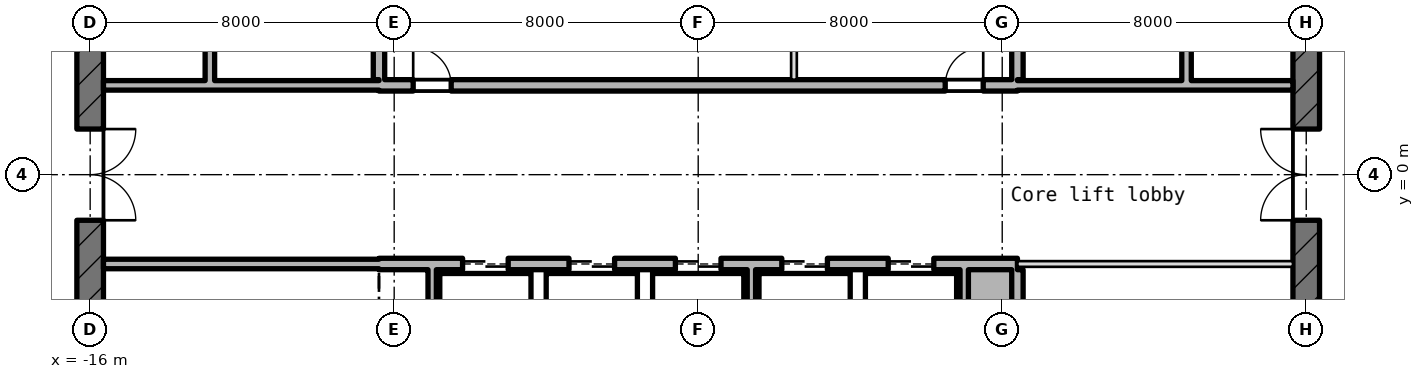
"""IFC4 building model, lengths in metres.
Left out: names, types, materials, properties, quantities, classifications, styles, units other than length and angle.
Written with IfcOpenShell. Run it as: python <this file> out.ifc"""

import sys

from ifc_helpers import new_model, si_unit, direction, frame, frame_2d, origin, place, context, subcontext, project, spatial, rectangle, extrude, element, fill, save


model = new_model("IFC4")
c1 = context("Model", 3, precision=1e-05, world=origin(), true_north=direction((0.0, 1.0)))
c2 = subcontext(c1, "Body", "Model", "MODEL_VIEW")
j1 = project(units=[si_unit("LENGTHUNIT", "METRE"), si_unit("PLANEANGLEUNIT", "RADIAN")], contexts=[c1])
p1 = place(None, origin())
s1 = spatial("IfcSite", under=j1, at=p1, CompositionType="ELEMENT")
p2 = place(p1, origin())
s2 = spatial("IfcBuilding", under=s1, at=p2, CompositionType="ELEMENT")
p3 = place(p2, frame((0.0, 0.0, 371.65)))
s3 = spatial("IfcBuildingStorey", under=s2, at=p3, CompositionType="ELEMENT", Elevation=371.65)
p4 = place(p3, frame((16.0, -10.145, -0.18), z_axis=(0.0, 0.0, 1.0), x_axis=(0.0, 1.0, 0.0)))
e1 = element("IfcWall", 1, at=p4, inside=s3, PredefinedType="SHEAR", context=c2, shape_type="SweptSolid", body=[
    extrude(rectangle(XDim=20.29, YDim=0.7, at=frame_2d((10.145, 0.0))), origin(), (0.0, 0.0, 1.0), 4.15),
])
p5 = place(p4, frame((8.945, 0.0, 0.18)))
e2 = element("IfcOpeningElement", 2, at=p5, cuts=e1, PredefinedType="OPENING", context=c2, shape_type="SweptSolid", body=[
    extrude(rectangle(XDim=2.4, YDim=2.1, at=frame_2d((1.2, 1.05))), frame((0.0, 0.36, 0.0), z_axis=(0.0, -1.0, 0.0), x_axis=(1.0, 0.0, 0.0)), (0.0, 0.0, 1.0), 0.72),
])
p6 = place(p4, frame((13.545, 0.0, 0.18)))
e3 = element("IfcOpeningElement", 3, at=p6, cuts=e1, PredefinedType="OPENING", context=c2, shape_type="SweptSolid", body=[
    extrude(rectangle(XDim=1.2, YDim=2.1, at=frame_2d((0.6, 1.05))), frame((0.0, 0.36, 0.0), z_axis=(0.0, -1.0, 0.0), x_axis=(1.0, 0.0, 0.0)), (0.0, 0.0, 1.0), 0.72),
])
p7 = place(p4, frame((3.545, 0.0, 0.18)))
e4 = element("IfcOpeningElement", 4, at=p7, cuts=e1, PredefinedType="OPENING", context=c2, shape_type="SweptSolid", body=[
    extrude(rectangle(XDim=1.2, YDim=2.1, at=frame_2d((0.6, 1.05))), frame((0.0, 0.36, 0.0), z_axis=(0.0, -1.0, 0.0), x_axis=(1.0, 0.0, 0.0)), (0.0, 0.0, 1.0), 0.72),
])
p8 = place(p3, frame((-16.0, 10.145, -0.18), z_axis=(0.0, 0.0, 1.0), x_axis=(0.0, -1.0, 0.0)))
e5 = element("IfcWall", 5, at=p8, inside=s3, PredefinedType="SHEAR", context=c2, shape_type="SweptSolid", body=[
    extrude(rectangle(XDim=20.29, YDim=0.7, at=frame_2d((10.145, 0.0))), origin(), (0.0, 0.0, 1.0), 4.15),
])
p9 = place(p8, frame((8.945, 0.0, 0.18)))
e6 = element("IfcOpeningElement", 6, at=p9, cuts=e5, PredefinedType="OPENING", context=c2, shape_type="SweptSolid", body=[
    extrude(rectangle(XDim=2.4, YDim=2.1, at=frame_2d((1.2, 1.05))), frame((0.0, 0.36, 0.0), z_axis=(0.0, -1.0, 0.0), x_axis=(1.0, 0.0, 0.0)), (0.0, 0.0, 1.0), 0.72),
])
p10 = place(p8, frame((5.545, 0.0, 0.18)))
e7 = element("IfcOpeningElement", 7, at=p10, cuts=e5, PredefinedType="OPENING", context=c2, shape_type="SweptSolid", body=[
    extrude(rectangle(XDim=1.2, YDim=2.1, at=frame_2d((0.6, 1.05))), frame((0.0, 0.36, 0.0), z_axis=(0.0, -1.0, 0.0), x_axis=(1.0, 0.0, 0.0)), (0.0, 0.0, 1.0), 0.72),
])
p11 = place(p3, frame((-15.65, -2.35, 0.0), z_axis=(0.0, 0.0, 1.0), x_axis=(1.0, 0.0, 0.0)))
e8 = element("IfcWall", 8, at=p11, inside=s3, PredefinedType="STANDARD", context=c2, shape_type="SweptSolid", body=[
    extrude(rectangle(XDim=7.25, YDim=0.25, at=frame_2d((3.625, 0.0))), origin(), (0.0, 0.0, 1.0), 3.97),
])
p12 = place(p3, frame((-8.4, -2.35, -0.18), z_axis=(0.0, 0.0, 1.0), x_axis=(1.0, 0.0, 0.0)))
e9 = element("IfcWall", 9, at=p12, inside=s3, PredefinedType="SHEAR", context=c2, shape_type="SweptSolid", body=[
    extrude(rectangle(XDim=16.8, YDim=0.3, at=frame_2d((8.4, 0.0))), origin(), (0.0, 0.0, 1.0), 4.15),
])
p13 = place(p12, frame((2.2, 0.0, 0.18)))
e10 = element("IfcOpeningElement", 10, at=p13, cuts=e9, PredefinedType="OPENING", context=c2, shape_type="SweptSolid", body=[
    extrude(rectangle(XDim=1.2, YDim=2.1, at=frame_2d((0.6, 1.05))), frame((0.0, 0.16, 0.0), z_axis=(0.0, -1.0, 0.0), x_axis=(1.0, 0.0, 0.0)), (0.0, 0.0, 1.0), 0.32),
])
p14 = place(p12, frame((5.0, 0.0, 0.18)))
e11 = element("IfcOpeningElement", 11, at=p14, cuts=e9, PredefinedType="OPENING", context=c2, shape_type="SweptSolid", body=[
    extrude(rectangle(XDim=1.2, YDim=2.1, at=frame_2d((0.6, 1.05))), frame((0.0, 0.16, 0.0), z_axis=(0.0, -1.0, 0.0), x_axis=(1.0, 0.0, 0.0)), (0.0, 0.0, 1.0), 0.32),
])
p15 = place(p12, frame((7.8, 0.0, 0.18)))
e12 = element("IfcOpeningElement", 12, at=p15, cuts=e9, PredefinedType="OPENING", context=c2, shape_type="SweptSolid", body=[
    extrude(rectangle(XDim=1.2, YDim=2.1, at=frame_2d((0.6, 1.05))), frame((0.0, 0.16, 0.0), z_axis=(0.0, -1.0, 0.0), x_axis=(1.0, 0.0, 0.0)), (0.0, 0.0, 1.0), 0.32),
])
p16 = place(p12, frame((10.6, 0.0, 0.18)))
e13 = element("IfcOpeningElement", 13, at=p16, cuts=e9, PredefinedType="OPENING", context=c2, shape_type="SweptSolid", body=[
    extrude(rectangle(XDim=1.2, YDim=2.1, at=frame_2d((0.6, 1.05))), frame((0.0, 0.16, 0.0), z_axis=(0.0, -1.0, 0.0), x_axis=(1.0, 0.0, 0.0)), (0.0, 0.0, 1.0), 0.32),
])
p17 = place(p12, frame((13.4, 0.0, 0.18)))
e14 = element("IfcOpeningElement", 14, at=p17, cuts=e9, PredefinedType="OPENING", context=c2, shape_type="SweptSolid", body=[
    extrude(rectangle(XDim=1.2, YDim=2.1, at=frame_2d((0.6, 1.05))), frame((0.0, 0.16, 0.0), z_axis=(0.0, -1.0, 0.0), x_axis=(1.0, 0.0, 0.0)), (0.0, 0.0, 1.0), 0.32),
])
p18 = place(p3, frame((8.4, -2.35, 0.0), z_axis=(0.0, 0.0, 1.0), x_axis=(1.0, 0.0, 0.0)))
e15 = element("IfcWall", 15, at=p18, inside=s3, PredefinedType="PARTITIONING", context=c2, shape_type="SweptSolid", body=[
    extrude(rectangle(XDim=7.25, YDim=0.15, at=frame_2d((3.625, 0.0))), origin(), (0.0, 0.0, 1.0), 3.97),
])
p19 = place(p3, frame((-15.65, 2.35, 0.0), z_axis=(0.0, 0.0, 1.0), x_axis=(1.0, 0.0, 0.0)))
e16 = element("IfcWall", 16, at=p19, inside=s3, PredefinedType="STANDARD", context=c2, shape_type="SweptSolid", body=[
    extrude(rectangle(XDim=7.25, YDim=0.25, at=frame_2d((3.625, 0.0))), origin(), (0.0, 0.0, 1.0), 3.97),
])
p20 = place(p3, frame((-8.4, 2.35, -0.18), z_axis=(0.0, 0.0, 1.0), x_axis=(1.0, 0.0, 0.0)))
e17 = element("IfcWall", 17, at=p20, inside=s3, PredefinedType="SHEAR", context=c2, shape_type="SweptSolid", body=[
    extrude(rectangle(XDim=16.8, YDim=0.3, at=frame_2d((8.4, 0.0))), origin(), (0.0, 0.0, 1.0), 4.15),
])
p21 = place(p20, frame((0.9, 0.0, 0.18)))
e18 = element("IfcOpeningElement", 18, at=p21, cuts=e17, PredefinedType="OPENING", context=c2, shape_type="SweptSolid", body=[
    extrude(rectangle(XDim=1.0, YDim=2.1, at=frame_2d((0.5, 1.05))), frame((0.0, 0.16, 0.0), z_axis=(0.0, -1.0, 0.0), x_axis=(1.0, 0.0, 0.0)), (0.0, 0.0, 1.0), 0.32),
])
p22 = place(p20, frame((14.9, 0.0, 0.18)))
e19 = element("IfcOpeningElement", 19, at=p22, cuts=e17, PredefinedType="OPENING", context=c2, shape_type="SweptSolid", body=[
    extrude(rectangle(XDim=1.0, YDim=2.1, at=frame_2d((0.5, 1.05))), frame((0.0, 0.16, 0.0), z_axis=(0.0, -1.0, 0.0), x_axis=(1.0, 0.0, 0.0)), (0.0, 0.0, 1.0), 0.32),
])
p23 = place(p3, frame((8.4, 2.35, 0.0), z_axis=(0.0, 0.0, 1.0), x_axis=(1.0, 0.0, 0.0)))
e20 = element("IfcWall", 20, at=p23, inside=s3, PredefinedType="STANDARD", context=c2, shape_type="SweptSolid", body=[
    extrude(rectangle(XDim=7.25, YDim=0.25, at=frame_2d((3.625, 0.0))), origin(), (0.0, 0.0, 1.0), 3.97),
])
p24 = place(p3, frame((-12.85, 2.475, 0.0), z_axis=(0.0, 0.0, 1.0), x_axis=(0.0, 1.0, 0.0)))
e21 = element("IfcWall", 21, at=p24, inside=s3, PredefinedType="STANDARD", context=c2, shape_type="SweptSolid", body=[
    extrude(rectangle(XDim=3.05, YDim=0.25, at=frame_2d((1.525, 0.0))), origin(), (0.0, 0.0, 1.0), 3.97),
])
p25 = place(p3, frame((-8.4, 2.5, -0.18), z_axis=(0.0, 0.0, 1.0), x_axis=(0.0, 1.0, 0.0)))
e22 = element("IfcWall", 22, at=p25, inside=s3, PredefinedType="SHEAR", context=c2, shape_type="SweptSolid", body=[
    extrude(rectangle(XDim=5.85, YDim=0.3, at=frame_2d((2.925, 0.0))), origin(), (0.0, 0.0, 1.0), 4.15),
])
for number, where, z_axis, x_axis in (
    (23, (-7.0, -5.24, 0.0), (0.0, 0.0, 1.0), (0.0, 1.0, 0.0)),
    (24, (1.4, -5.24, 0.0), (0.0, 0.0, 1.0), (0.0, 1.0, 0.0)),
):
    element("IfcWall", number, at=place(p3, frame(where, z_axis=z_axis, x_axis=x_axis)), inside=s3, PredefinedType="STANDARD", context=c2, shape_type="SweptSolid", body=[
        extrude(rectangle(XDim=2.74, YDim=0.22, at=frame_2d((1.37, 0.0))), origin(), (0.0, 0.0, 1.0), 3.97),
    ])
p26 = place(p3, frame((2.52, 2.5, 0.0), z_axis=(0.0, 0.0, 1.0), x_axis=(0.0, 1.0, 0.0)))
e25 = element("IfcWall", 25, at=p26, inside=s3, PredefinedType="PARTITIONING", context=c2, shape_type="SweptSolid", body=[
    extrude(rectangle(XDim=2.775, YDim=0.15, at=frame_2d((1.387, 0.0))), origin(), (0.0, 0.0, 1.0), 3.97),
])
p27 = place(p3, frame((7.0, -5.24, 0.0), z_axis=(0.0, 0.0, 1.0), x_axis=(0.0, 1.0, 0.0)))
e26 = element("IfcWall", 26, at=p27, inside=s3, PredefinedType="STANDARD", context=c2, shape_type="SweptSolid", body=[
    extrude(rectangle(XDim=2.74, YDim=0.22, at=frame_2d((1.37, 0.0))), origin(), (0.0, 0.0, 1.0), 3.97),
])
for number, where, z_axis, x_axis in (
    (27, (8.4, -8.35, -0.18), (0.0, 0.0, 1.0), (0.0, 1.0, 0.0)),
    (28, (8.4, 2.5, -0.18), (0.0, 0.0, 1.0), (0.0, 1.0, 0.0)),
):
    element("IfcWall", number, at=place(p3, frame(where, z_axis=z_axis, x_axis=x_axis)), inside=s3, PredefinedType="SHEAR", context=c2, shape_type="SweptSolid", body=[
        extrude(rectangle(XDim=5.85, YDim=0.3, at=frame_2d((2.925, 0.0))), origin(), (0.0, 0.0, 1.0), 4.15),
    ])
p28 = place(p3, frame((12.85, 2.475, 0.0), z_axis=(0.0, 0.0, 1.0), x_axis=(0.0, 1.0, 0.0)))
e29 = element("IfcWall", 29, at=p28, inside=s3, PredefinedType="STANDARD", context=c2, shape_type="SweptSolid", body=[
    extrude(rectangle(XDim=3.05, YDim=0.25, at=frame_2d((1.525, 0.0))), origin(), (0.0, 0.0, 1.0), 3.97),
])
p29 = place(p13, origin())
e30 = element("IfcDoor", 30, at=p29, inside=s3, OperationType="DOUBLE_DOOR_SLIDING", PredefinedType="DOOR", context=c2, shape_type="SweptSolid", body=[
    extrude(rectangle(XDim=1.2, YDim=2.1, at=frame_2d((0.6, 1.05))), frame((0.0, 0.025, 0.0), z_axis=(0.0, -1.0, 0.0), x_axis=(1.0, 0.0, 0.0)), (0.0, 0.0, 1.0), 0.05),
])
fill(e10, e30)
p30 = place(p14, origin())
e31 = element("IfcDoor", 31, at=p30, inside=s3, OperationType="DOUBLE_DOOR_SLIDING", PredefinedType="DOOR", context=c2, shape_type="SweptSolid", body=[
    extrude(rectangle(XDim=1.2, YDim=2.1, at=frame_2d((0.6, 1.05))), frame((0.0, 0.025, 0.0), z_axis=(0.0, -1.0, 0.0), x_axis=(1.0, 0.0, 0.0)), (0.0, 0.0, 1.0), 0.05),
])
fill(e11, e31)
p31 = place(p15, origin())
e32 = element("IfcDoor", 32, at=p31, inside=s3, OperationType="DOUBLE_DOOR_SLIDING", PredefinedType="DOOR", context=c2, shape_type="SweptSolid", body=[
    extrude(rectangle(XDim=1.2, YDim=2.1, at=frame_2d((0.6, 1.05))), frame((0.0, 0.025, 0.0), z_axis=(0.0, -1.0, 0.0), x_axis=(1.0, 0.0, 0.0)), (0.0, 0.0, 1.0), 0.05),
])
fill(e12, e32)
p32 = place(p16, origin())
e33 = element("IfcDoor", 33, at=p32, inside=s3, OperationType="DOUBLE_DOOR_SLIDING", PredefinedType="DOOR", context=c2, shape_type="SweptSolid", body=[
    extrude(rectangle(XDim=1.2, YDim=2.1, at=frame_2d((0.6, 1.05))), frame((0.0, 0.025, 0.0), z_axis=(0.0, -1.0, 0.0), x_axis=(1.0, 0.0, 0.0)), (0.0, 0.0, 1.0), 0.05),
])
fill(e13, e33)
p33 = place(p17, origin())
e34 = element("IfcDoor", 34, at=p33, inside=s3, OperationType="DOUBLE_DOOR_SLIDING", PredefinedType="DOOR", context=c2, shape_type="SweptSolid", body=[
    extrude(rectangle(XDim=1.2, YDim=2.1, at=frame_2d((0.6, 1.05))), frame((0.0, 0.025, 0.0), z_axis=(0.0, -1.0, 0.0), x_axis=(1.0, 0.0, 0.0)), (0.0, 0.0, 1.0), 0.05),
])
fill(e14, e34)
p34 = place(p9, origin())
e35 = element("IfcDoor", 35, at=p34, inside=s3, OperationType="DOUBLE_DOOR_SINGLE_SWING", PredefinedType="DOOR", context=c2, shape_type="SweptSolid", body=[
    extrude(rectangle(XDim=2.4, YDim=2.1, at=frame_2d((1.2, 1.05))), frame((0.0, 0.025, 0.0), z_axis=(0.0, -1.0, 0.0), x_axis=(1.0, 0.0, 0.0)), (0.0, 0.0, 1.0), 0.05),
])
fill(e6, e35)
p35 = place(p5, origin())
e36 = element("IfcDoor", 36, at=p35, inside=s3, OperationType="DOUBLE_DOOR_SINGLE_SWING", PredefinedType="DOOR", context=c2, shape_type="SweptSolid", body=[
    extrude(rectangle(XDim=2.4, YDim=2.1, at=frame_2d((1.2, 1.05))), frame((0.0, 0.025, 0.0), z_axis=(0.0, -1.0, 0.0), x_axis=(1.0, 0.0, 0.0)), (0.0, 0.0, 1.0), 0.05),
])
fill(e2, e36)
p36 = place(p21, origin())
e37 = element("IfcDoor", 37, at=p36, inside=s3, OperationType="SINGLE_SWING_RIGHT", PredefinedType="DOOR", context=c2, shape_type="SweptSolid", body=[
    extrude(rectangle(XDim=1.0, YDim=2.1, at=frame_2d((0.5, 1.05))), frame((0.0, 0.025, 0.0), z_axis=(0.0, -1.0, 0.0), x_axis=(1.0, 0.0, 0.0)), (0.0, 0.0, 1.0), 0.05),
])
fill(e18, e37)
p37 = place(p22, origin())
e38 = element("IfcDoor", 38, at=p37, inside=s3, OperationType="SINGLE_SWING_RIGHT", PredefinedType="DOOR", context=c2, shape_type="SweptSolid", body=[
    extrude(rectangle(XDim=1.0, YDim=2.1, at=frame_2d((0.5, 1.05))), frame((0.0, 0.025, 0.0), z_axis=(0.0, -1.0, 0.0), x_axis=(1.0, 0.0, 0.0)), (0.0, 0.0, 1.0), 0.05),
])
fill(e19, e38)
save(model, sys.argv[1])
